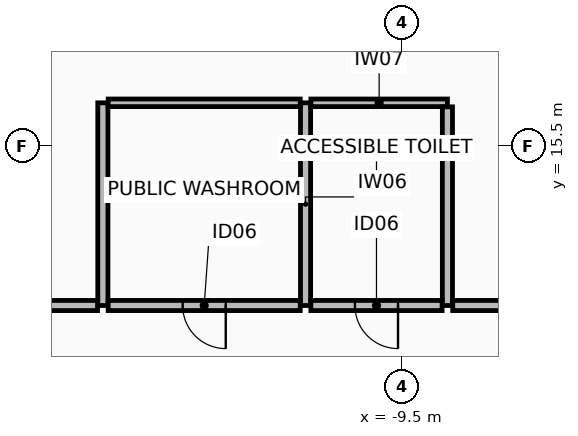
"""IFC4 building model, lengths in metres.
Left out: names, types, materials, properties, quantities, classifications, styles, units other than length and angle.
Written with IfcOpenShell. Run it as: python <this file> out.ifc"""

import sys

from ifc_helpers import new_model, si_unit, direction, frame, frame_2d, origin, place, context, subcontext, project, spatial, rectangle, extrude, element, fill, save


model = new_model("IFC4")
c1 = context("Model", 3, precision=1e-05, world=origin(), true_north=direction((0.0, 1.0)))
c2 = subcontext(c1, "Body", "Model", "MODEL_VIEW")
j1 = project(units=[si_unit("LENGTHUNIT", "METRE"), si_unit("PLANEANGLEUNIT", "RADIAN")], contexts=[c1])
p1 = place(None, origin())
s1 = spatial("IfcSite", under=j1, at=p1, CompositionType="ELEMENT")
p2 = place(p1, origin())
s2 = spatial("IfcBuilding", under=s1, at=p2, CompositionType="ELEMENT")
p3 = place(p2, frame((0.0, 0.0, 5.5)))
s3 = spatial("IfcBuildingStorey", under=s2, at=p3, CompositionType="ELEMENT", Elevation=5.5)
p4 = place(p3, frame((-11.4, 12.35, 0.0), z_axis=(0.0, 0.0, 1.0), x_axis=(0.0, 1.0, 0.0)))
e1 = element("IfcWall", 1, at=p4, inside=s3, PredefinedType="PARTITIONING", context=c2, shape_type="SweptSolid", body=[
    extrude(rectangle(XDim=4.0, YDim=0.2, at=frame_2d((2.0, 0.0))), origin(), (0.0, 0.0, 1.0), 4.765),
])
p5 = place(p3, frame((-11.295, 16.35, 0.0), z_axis=(0.0, 0.0, 1.0), x_axis=(1.0, 0.0, 0.0)))
e2 = element("IfcWall", 2, at=p5, inside=s3, PredefinedType="PARTITIONING", context=c2, shape_type="SweptSolid", body=[
    extrude(rectangle(XDim=2.695, YDim=0.15, at=frame_2d((1.347, 0.0))), origin(), (0.0, 0.0, 1.0), 4.565),
])
p6 = place(p3, frame((-8.6, 16.27, 0.0), z_axis=(0.0, 0.0, 1.0), x_axis=(0.0, -1.0, 0.0)))
e3 = element("IfcWall", 3, at=p6, inside=s3, PredefinedType="PARTITIONING", context=c2, shape_type="SweptSolid", body=[
    extrude(rectangle(XDim=3.92, YDim=0.2, at=frame_2d((1.96, 0.0))), origin(), (0.0, 0.0, 1.0), 4.765),
])
p7 = place(p3, frame((-8.705, 12.35, 0.0), z_axis=(0.0, 0.0, 1.0), x_axis=(-1.0, 0.0, 0.0)))
e4 = element("IfcWall", 4, at=p7, inside=s3, PredefinedType="PARTITIONING", context=c2, shape_type="SweptSolid", body=[
    extrude(rectangle(XDim=2.59, YDim=0.2, at=frame_2d((1.295, 0.0))), origin(), (0.0, 0.0, 1.0), 4.565),
])
p8 = place(p7, frame((0.87, 0.0, 0.0)))
e5 = element("IfcOpeningElement", 5, at=p8, cuts=e4, PredefinedType="OPENING", context=c2, shape_type="SweptSolid", body=[
    extrude(rectangle(XDim=0.85, YDim=2.1, at=frame_2d((0.425, 1.05))), frame((0.0, 0.11, 0.0), z_axis=(0.0, -1.0, 0.0), x_axis=(1.0, 0.0, 0.0)), (0.0, 0.0, 1.0), 0.22),
])
p9 = place(p3, frame((-15.4, 12.35, 0.0), z_axis=(0.0, 0.0, 1.0), x_axis=(0.0, 1.0, 0.0)))
e6 = element("IfcWall", 6, at=p9, inside=s3, PredefinedType="PARTITIONING", context=c2, shape_type="SweptSolid", body=[
    extrude(rectangle(XDim=4.0, YDim=0.2, at=frame_2d((2.0, 0.0))), origin(), (0.0, 0.0, 1.0), 4.765),
])
p10 = place(p3, frame((-15.295, 16.35, 0.0), z_axis=(0.0, 0.0, 1.0), x_axis=(1.0, 0.0, 0.0)))
e7 = element("IfcWall", 7, at=p10, inside=s3, PredefinedType="PARTITIONING", context=c2, shape_type="SweptSolid", body=[
    extrude(rectangle(XDim=3.79, YDim=0.15, at=frame_2d((1.895, 0.0))), origin(), (0.0, 0.0, 1.0), 5.22),
])
p11 = place(p3, frame((-11.505, 12.35, 0.0), z_axis=(0.0, 0.0, 1.0), x_axis=(-1.0, 0.0, 0.0)))
e8 = element("IfcWall", 8, at=p11, inside=s3, PredefinedType="PARTITIONING", context=c2, shape_type="SweptSolid", body=[
    extrude(rectangle(XDim=3.79, YDim=0.2, at=frame_2d((1.895, 0.0))), origin(), (0.0, 0.0, 1.0), 5.22),
])
p12 = place(p11, frame((1.47, 0.0, 0.0)))
e9 = element("IfcOpeningElement", 9, at=p12, cuts=e8, PredefinedType="OPENING", context=c2, shape_type="SweptSolid", body=[
    extrude(rectangle(XDim=0.85, YDim=2.1, at=frame_2d((0.425, 1.05))), frame((0.0, 0.11, 0.0), z_axis=(0.0, -1.0, 0.0), x_axis=(1.0, 0.0, 0.0)), (0.0, 0.0, 1.0), 0.22),
])
p13 = place(p3, frame((1.058, 12.35, 0.0), z_axis=(0.0, 0.0, 1.0), x_axis=(-1.0, 0.0, 0.0)))
e10 = element("IfcWall", 10, at=p13, inside=s3, PredefinedType="PARTITIONING", context=c2, shape_type="SweptSolid", body=[
    extrude(rectangle(XDim=9.553, YDim=0.2, at=frame_2d((4.776, 0.0))), origin(), (0.0, 0.0, 1.0), 5.22),
])
p14 = place(p13, frame((4.176, 0.0, 0.0)))
e11 = element("IfcOpeningElement", 11, at=p14, cuts=e10, PredefinedType="OPENING", context=c2, shape_type="SweptSolid", body=[
    extrude(rectangle(XDim=1.2, YDim=2.15, at=frame_2d((0.6, 1.075))), frame((0.0, 0.11, 0.0), z_axis=(0.0, -1.0, 0.0), x_axis=(1.0, 0.0, 0.0)), (0.0, 0.0, 1.0), 0.22),
])
p15 = place(p3, frame((-15.505, 12.35, 0.0), z_axis=(0.0, 0.0, 1.0), x_axis=(-1.0, 0.0, 0.0)))
e12 = element("IfcWall", 12, at=p15, inside=s3, PredefinedType="PARTITIONING", context=c2, shape_type="SweptSolid", body=[
    extrude(rectangle(XDim=2.044, YDim=0.2, at=frame_2d((1.022, 0.0))), origin(), (0.0, 0.0, 1.0), 4.565),
])
p16 = place(p8, origin())
e13 = element("IfcDoor", 13, at=p16, inside=s3, OperationType="SINGLE_SWING_RIGHT", PredefinedType="DOOR", context=c2, shape_type="SweptSolid", body=[
    extrude(rectangle(XDim=0.85, YDim=2.1, at=frame_2d((0.425, 1.05))), frame((0.0, 0.025, 0.0), z_axis=(0.0, -1.0, 0.0), x_axis=(1.0, 0.0, 0.0)), (0.0, 0.0, 1.0), 0.05),
])
fill(e5, e13)
p17 = place(p12, origin())
e14 = element("IfcDoor", 14, at=p17, inside=s3, OperationType="SINGLE_SWING_RIGHT", PredefinedType="DOOR", context=c2, shape_type="SweptSolid", body=[
    extrude(rectangle(XDim=0.85, YDim=2.1, at=frame_2d((0.425, 1.05))), frame((0.0, 0.025, 0.0), z_axis=(0.0, -1.0, 0.0), x_axis=(1.0, 0.0, 0.0)), (0.0, 0.0, 1.0), 0.05),
])
fill(e9, e14)
save(model, sys.argv[1])
